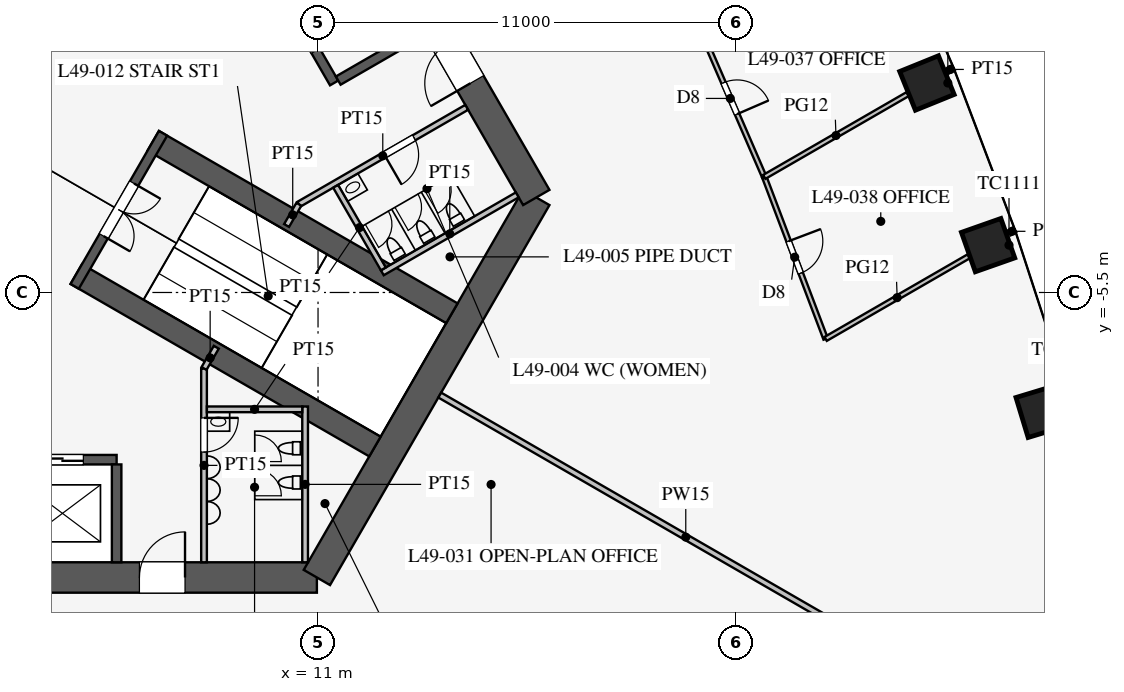
"""IFC4 building model, lengths in metres.
Left out: names, types, materials, properties, quantities, classifications, styles, units other than length and angle.
Written with IfcOpenShell. Run it as: python <this file> out.ifc"""

import sys

from ifc_helpers import new_model, si_unit, direction, frame, frame_2d, origin, origin_2d, place, context, subcontext, project, spatial, rectangle, extrude, element, fill, save


model = new_model("IFC4")
c1 = context("Model", 3, precision=1e-05, world=origin(), true_north=direction((0.0, 1.0)))
c2 = subcontext(c1, "Body", "Model", "MODEL_VIEW")
j1 = project(units=[si_unit("LENGTHUNIT", "METRE"), si_unit("PLANEANGLEUNIT", "RADIAN")], contexts=[c1])
p1 = place(None, origin())
s1 = spatial("IfcSite", under=j1, at=p1, CompositionType="ELEMENT")
p2 = place(p1, origin())
s2 = spatial("IfcBuilding", under=s1, at=p2, CompositionType="ELEMENT")
p3 = place(p2, frame((0.0, 0.0, 214.9)))
s3 = spatial("IfcBuildingStorey", under=s2, at=p3, CompositionType="ELEMENT", Elevation=214.9)
for number, where, z_axis, x_axis in (
    (1, (30.052, -8.63, 0.0), (0.0, 0.0, 1.0), (-0.29, 0.957, 0.0)),
    (2, (28.632, -4.254, 0.0), (0.0, 0.0, 1.0), (-0.332, 0.943, 0.0)),
    (3, (27.022, 0.013, 0.0), (0.0, 0.0, 1.0), (-0.376, 0.927, 0.0)),
):
    element("IfcColumn", number, at=place(p3, frame(where, z_axis=z_axis, x_axis=x_axis)), inside=s3, PredefinedType="COLUMN", context=c2, shape_type="SweptSolid", body=[
        extrude(rectangle(XDim=1.1, YDim=1.1, at=origin_2d()), origin(), (0.0, 0.0, 1.0), 4.2),
    ])
p4 = place(p3, frame((-10.97, -13.0, 0.0), z_axis=(0.0, 0.0, 1.0), x_axis=(1.0, 0.0, 0.0)))
e4 = element("IfcWall", 4, at=p4, inside=s3, PredefinedType="SHEAR", context=c2, shape_type="SweptSolid", body=[
    extrude(rectangle(XDim=21.939, YDim=0.8, at=frame_2d((10.97, 0.0))), origin(), (0.0, 0.0, 1.0), 4.2),
])
p5 = place(p4, frame((17.27, 0.0, 0.0)))
e5 = element("IfcOpeningElement", 5, at=p5, cuts=e4, PredefinedType="OPENING", context=c2, shape_type="SweptSolid", body=[
    extrude(rectangle(XDim=1.2, YDim=2.1, at=frame_2d((0.6, 1.05))), frame((0.0, 0.41, 0.0), z_axis=(0.0, -1.0, 0.0), x_axis=(1.0, 0.0, 0.0)), (0.0, 0.0, 1.0), 0.82),
])
p6 = place(p4, frame((3.47, 0.0, 0.0)))
e6 = element("IfcOpeningElement", 6, at=p6, cuts=e4, PredefinedType="OPENING", context=c2, shape_type="SweptSolid", body=[
    extrude(rectangle(XDim=1.2, YDim=2.1, at=frame_2d((0.6, 1.05))), frame((0.0, 0.41, 0.0), z_axis=(0.0, -1.0, 0.0), x_axis=(1.0, 0.0, 0.0)), (0.0, 0.0, 1.0), 0.82),
])
p7 = place(p3, frame((10.97, -13.0, 0.0), z_axis=(0.0, 0.0, 1.0), x_axis=(0.499995765644, 0.866027848477, 0.0)))
e7 = element("IfcWall", 7, at=p7, inside=s3, PredefinedType="SHEAR", context=c2, shape_type="SweptSolid", body=[
    extrude(rectangle(XDim=11.547, YDim=0.8, at=frame_2d((5.773, 0.0))), origin(), (0.0, 0.0, 1.0), 4.2),
])
p8 = place(p3, frame((16.743, -3.0, 0.0), z_axis=(0.0, 0.0, 1.0), x_axis=(-0.500002442456, 0.866023993627, 0.0)))
e8 = element("IfcWall", 8, at=p8, inside=s3, PredefinedType="SHEAR", context=c2, shape_type="SweptSolid", body=[
    extrude(rectangle(XDim=21.939, YDim=0.8, at=frame_2d((10.97, 0.0))), origin(), (0.0, 0.0, 1.0), 4.2),
])
p9 = place(p8, frame((17.27, 0.0, 0.0)))
e9 = element("IfcOpeningElement", 9, at=p9, cuts=e8, PredefinedType="OPENING", context=c2, shape_type="SweptSolid", body=[
    extrude(rectangle(XDim=1.2, YDim=2.1, at=frame_2d((0.6, 1.05))), frame((0.0, 0.41, 0.0), z_axis=(0.0, -1.0, 0.0), x_axis=(1.0, 0.0, 0.0)), (0.0, 0.0, 1.0), 0.82),
])
p10 = place(p8, frame((3.47, 0.0, 0.0)))
e10 = element("IfcOpeningElement", 10, at=p10, cuts=e8, PredefinedType="OPENING", context=c2, shape_type="SweptSolid", body=[
    extrude(rectangle(XDim=1.2, YDim=2.1, at=frame_2d((0.6, 1.05))), frame((0.0, 0.41, 0.0), z_axis=(0.0, -1.0, 0.0), x_axis=(1.0, 0.0, 0.0)), (0.0, 0.0, 1.0), 0.82),
])
p11 = place(p3, frame((-5.7, -9.9, 0.0), z_axis=(0.0, 0.0, 1.0), x_axis=(1.0, 0.0, 0.0)))
e11 = element("IfcWall", 11, at=p11, inside=s3, PredefinedType="SHEAR", context=c2, shape_type="SweptSolid", body=[
    extrude(rectangle(XDim=11.4, YDim=0.25, at=frame_2d((5.7, 0.0))), origin(), (0.0, 0.0, 1.0), 4.2),
])
p12 = place(p11, frame((0.875, 0.0, 0.0)))
e12 = element("IfcOpeningElement", 12, at=p12, cuts=e11, PredefinedType="OPENING", context=c2, shape_type="SweptSolid", body=[
    extrude(rectangle(XDim=1.1, YDim=2.2, at=frame_2d((0.55, 1.1))), frame((0.0, 0.135, 0.0), z_axis=(0.0, -1.0, 0.0), x_axis=(1.0, 0.0, 0.0)), (0.0, 0.0, 1.0), 0.27),
])
p13 = place(p11, frame((3.725, 0.0, 0.0)))
e13 = element("IfcOpeningElement", 13, at=p13, cuts=e11, PredefinedType="OPENING", context=c2, shape_type="SweptSolid", body=[
    extrude(rectangle(XDim=1.1, YDim=2.2, at=frame_2d((0.55, 1.1))), frame((0.0, 0.135, 0.0), z_axis=(0.0, -1.0, 0.0), x_axis=(1.0, 0.0, 0.0)), (0.0, 0.0, 1.0), 0.27),
])
p14 = place(p11, frame((6.575, 0.0, 0.0)))
e14 = element("IfcOpeningElement", 14, at=p14, cuts=e11, PredefinedType="OPENING", context=c2, shape_type="SweptSolid", body=[
    extrude(rectangle(XDim=1.1, YDim=2.2, at=frame_2d((0.55, 1.1))), frame((0.0, 0.135, 0.0), z_axis=(0.0, -1.0, 0.0), x_axis=(1.0, 0.0, 0.0)), (0.0, 0.0, 1.0), 0.27),
])
p15 = place(p11, frame((9.425, 0.0, 0.0)))
e15 = element("IfcOpeningElement", 15, at=p15, cuts=e11, PredefinedType="OPENING", context=c2, shape_type="SweptSolid", body=[
    extrude(rectangle(XDim=1.1, YDim=2.2, at=frame_2d((0.55, 1.1))), frame((0.0, 0.135, 0.0), z_axis=(0.0, -1.0, 0.0), x_axis=(1.0, 0.0, 0.0)), (0.0, 0.0, 1.0), 0.27),
])
p16 = place(p3, frame((5.7, -10.025, 0.0), z_axis=(0.0, 0.0, 1.0), x_axis=(0.0, -1.0, 0.0)))
e16 = element("IfcWall", 16, at=p16, inside=s3, PredefinedType="SHEAR", context=c2, shape_type="SweptSolid", body=[
    extrude(rectangle(XDim=2.575, YDim=0.25, at=frame_2d((1.288, 0.0))), origin(), (0.0, 0.0, 1.0), 4.2),
])
p17 = place(p3, frame((11.424, 0.014, 0.0), z_axis=(0.0, 0.0, 1.0), x_axis=(-0.500001763848, 0.866024385424, 0.0)))
e17 = element("IfcWall", 17, at=p17, inside=s3, PredefinedType="SHEAR", context=c2, shape_type="SweptSolid", body=[
    extrude(rectangle(XDim=11.4, YDim=0.25, at=frame_2d((5.7, 0.0))), origin(), (0.0, 0.0, 1.0), 4.2),
])
p18 = place(p17, frame((0.975, 0.0, 0.0)))
e18 = element("IfcOpeningElement", 18, at=p18, cuts=e17, PredefinedType="OPENING", context=c2, shape_type="SweptSolid", body=[
    extrude(rectangle(XDim=0.9, YDim=2.1, at=frame_2d((0.45, 1.05))), frame((0.0, 0.135, 0.0), z_axis=(0.0, -1.0, 0.0), x_axis=(1.0, 0.0, 0.0)), (0.0, 0.0, 1.0), 0.27),
])
p19 = place(p17, frame((3.825, 0.0, 0.0)))
e19 = element("IfcOpeningElement", 19, at=p19, cuts=e17, PredefinedType="OPENING", context=c2, shape_type="SweptSolid", body=[
    extrude(rectangle(XDim=0.9, YDim=2.1, at=frame_2d((0.45, 1.05))), frame((0.0, 0.135, 0.0), z_axis=(0.0, -1.0, 0.0), x_axis=(1.0, 0.0, 0.0)), (0.0, 0.0, 1.0), 0.27),
])
p20 = place(p17, frame((6.675, 0.0, 0.0)))
e20 = element("IfcOpeningElement", 20, at=p20, cuts=e17, PredefinedType="OPENING", context=c2, shape_type="SweptSolid", body=[
    extrude(rectangle(XDim=0.9, YDim=2.1, at=frame_2d((0.45, 1.05))), frame((0.0, 0.135, 0.0), z_axis=(0.0, -1.0, 0.0), x_axis=(1.0, 0.0, 0.0)), (0.0, 0.0, 1.0), 0.27),
])
p21 = place(p17, frame((9.525, 0.0, 0.0)))
e21 = element("IfcOpeningElement", 21, at=p21, cuts=e17, PredefinedType="OPENING", context=c2, shape_type="SweptSolid", body=[
    extrude(rectangle(XDim=0.9, YDim=2.1, at=frame_2d((0.45, 1.05))), frame((0.0, 0.135, 0.0), z_axis=(0.0, -1.0, 0.0), x_axis=(1.0, 0.0, 0.0)), (0.0, 0.0, 1.0), 0.27),
])
p22 = place(p3, frame((11.532, 0.076, 0.0), z_axis=(0.0, 0.0, 1.0), x_axis=(0.866005588531, 0.500034319456, 0.0)))
e22 = element("IfcWall", 22, at=p22, inside=s3, PredefinedType="SHEAR", context=c2, shape_type="SweptSolid", body=[
    extrude(rectangle(XDim=2.575, YDim=0.25, at=frame_2d((1.288, 0.0))), origin(), (0.0, 0.0, 1.0), 4.2),
])
for number, where, z_axis, x_axis in (
    (23, (4.638, -5.016, 0.0), (0.0, 0.0, 1.0), (0.866, -0.5, 0.0)),
    (24, (6.663, -1.509, 0.0), (0.0, 0.0, 1.0), (0.866, -0.5, 0.0)),
):
    element("IfcWall", number, at=place(p3, frame(where, z_axis=z_axis, x_axis=x_axis)), inside=s3, PredefinedType="SHEAR", context=c2, shape_type="SweptSolid", body=[
        extrude(rectangle(XDim=9.075, YDim=0.6, at=frame_2d((4.538, 0.0))), origin(), (0.0, 0.0, 1.0), 4.2),
    ])
p23 = place(p3, frame((4.597, -5.339, 0.0), z_axis=(0.0, 0.0, 1.0), x_axis=(0.499984536904, 0.866034331223, 0.0)))
e25 = element("IfcWall", 25, at=p23, inside=s3, PredefinedType="SHEAR", context=c2, shape_type="SweptSolid", body=[
    extrude(rectangle(XDim=4.65, YDim=0.25, at=frame_2d((2.325, 0.0))), origin(), (0.0, 0.0, 1.0), 4.2),
])
p24 = place(p23, frame((1.525, 0.0, 0.0)))
e26 = element("IfcOpeningElement", 26, at=p24, cuts=e25, PredefinedType="OPENING", context=c2, shape_type="SweptSolid", body=[
    extrude(rectangle(XDim=1.6, YDim=2.1, at=frame_2d((0.8, 1.05))), frame((0.0, 0.135, 0.0), z_axis=(0.0, -1.0, 0.0), x_axis=(1.0, 0.0, 0.0)), (0.0, 0.0, 1.0), 0.27),
])
p25 = place(p3, frame((8.0, -7.5, 0.0), z_axis=(0.0, 0.0, 1.0), x_axis=(0.0, -1.0, 0.0)))
e27 = element("IfcWall", 27, at=p25, inside=s3, PredefinedType="PARTITIONING", context=c2, shape_type="SweptSolid", body=[
    extrude(rectangle(XDim=5.1, YDim=0.15, at=frame_2d((2.55, 0.0))), origin(), (0.0, 0.0, 1.0), 4.0),
])
p26 = place(p25, frame((1.3, 0.0, 0.0)))
e28 = element("IfcOpeningElement", 28, at=p26, cuts=e27, PredefinedType="OPENING", context=c2, shape_type="SweptSolid", body=[
    extrude(rectangle(XDim=0.9, YDim=2.1, at=frame_2d((0.45, 1.05))), frame((0.0, 0.085, 0.0), z_axis=(0.0, -1.0, 0.0), x_axis=(1.0, 0.0, 0.0)), (0.0, 0.0, 1.0), 0.17),
])
p27 = place(p3, frame((10.495, -3.178, 0.0), z_axis=(0.0, 0.0, 1.0), x_axis=(0.86602216432, 0.500005610874, 0.0)))
e29 = element("IfcWall", 29, at=p27, inside=s3, PredefinedType="PARTITIONING", context=c2, shape_type="SweptSolid", body=[
    extrude(rectangle(XDim=5.1, YDim=0.15, at=frame_2d((2.55, 0.0))), origin(), (0.0, 0.0, 1.0), 4.0),
])
p28 = place(p27, frame((2.6, 0.0, 0.0)))
e30 = element("IfcOpeningElement", 30, at=p28, cuts=e29, PredefinedType="OPENING", context=c2, shape_type="SweptSolid", body=[
    extrude(rectangle(XDim=0.9, YDim=2.1, at=frame_2d((0.45, 1.05))), frame((0.0, 0.085, 0.0), z_axis=(0.0, -1.0, 0.0), x_axis=(1.0, 0.0, 0.0)), (0.0, 0.0, 1.0), 0.17),
])
for number, where, z_axis, x_axis in (
    (31, (8.0, -7.5, 0.0), (0.0, 0.0, 1.0), (0.5, 0.866, 0.0)),
    (32, (10.495, -3.178, 0.0), (0.0, 0.0, 1.0), (-0.5, -0.866, 0.0)),
):
    element("IfcWall", number, at=place(p3, frame(where, z_axis=z_axis, x_axis=x_axis)), inside=s3, PredefinedType="PARTITIONING", context=c2, shape_type="SweptSolid", body=[
        extrude(rectangle(XDim=0.645, YDim=0.15, at=frame_2d((0.323, 0.0))), origin(), (0.0, 0.0, 1.0), 4.0),
    ])
p29 = place(p3, frame((10.66, -8.5, 0.0), z_axis=(0.0, 0.0, 1.0), x_axis=(0.0, -1.0, 0.0)))
e33 = element("IfcWall", 33, at=p29, inside=s3, PredefinedType="PARTITIONING", context=c2, shape_type="SweptSolid", body=[
    extrude(rectangle(XDim=4.1, YDim=0.15, at=frame_2d((2.05, 0.0))), origin(), (0.0, 0.0, 1.0), 4.0),
])
p30 = place(p3, frame((8.075, -8.575, 0.0), z_axis=(0.0, 0.0, 1.0), x_axis=(1.0, 0.0, 0.0)))
e34 = element("IfcWall", 34, at=p30, inside=s3, PredefinedType="PARTITIONING", context=c2, shape_type="SweptSolid", body=[
    extrude(rectangle(XDim=2.51, YDim=0.15, at=frame_2d((1.255, 0.0))), origin(), (0.0, 0.0, 1.0), 4.0),
])
p31 = place(p3, frame((12.691, -4.982, 0.0), z_axis=(0.0, 0.0, 1.0), x_axis=(0.8660249478, 0.500000789788, 0.0)))
e35 = element("IfcWall", 35, at=p31, inside=s3, PredefinedType="PARTITIONING", context=c2, shape_type="SweptSolid", body=[
    extrude(rectangle(XDim=4.1, YDim=0.15, at=frame_2d((2.05, 0.0))), origin(), (0.0, 0.0, 1.0), 4.0),
])
p32 = place(p3, frame((11.464, -2.706, 0.0), z_axis=(0.0, 0.0, 1.0), x_axis=(0.50001992892, -0.866013897511, 0.0)))
e36 = element("IfcWall", 36, at=p32, inside=s3, PredefinedType="PARTITIONING", context=c2, shape_type="SweptSolid", body=[
    extrude(rectangle(XDim=2.51, YDim=0.15, at=frame_2d((1.255, 0.0))), origin(), (0.0, 0.0, 1.0), 4.0),
])
p33 = place(p3, frame((14.203, -8.2, 0.0), z_axis=(0.0, 0.0, 1.0), x_axis=(0.866021600284, -0.500006587798, 0.0)))
e37 = element("IfcWall", 37, at=p33, inside=s3, PredefinedType="PARTITIONING", context=c2, shape_type="SweptSolid", body=[
    extrude(rectangle(XDim=14.95, YDim=0.15, at=frame_2d((7.475, 0.0))), origin(), (0.0, 0.0, 1.0), 2.4),
])
p34 = place(p3, frame((27.563, 0.325, 0.0), z_axis=(0.0, 0.0, 1.0), x_axis=(0.865614066289, 0.500711781609, 0.0)))
e38 = element("IfcWall", 38, at=p34, inside=s3, PredefinedType="PARTITIONING", context=c2, shape_type="SweptSolid", body=[
    extrude(rectangle(XDim=0.178, YDim=0.15, at=frame_2d((0.089, 0.0))), origin(), (0.0, 0.0, 1.0), 2.9),
])
p35 = place(p3, frame((29.191, -3.931, 0.0), z_axis=(0.0, 0.0, 1.0), x_axis=(0.866484919499, 0.499203249469, 0.0)))
e39 = element("IfcWall", 39, at=p35, inside=s3, PredefinedType="PARTITIONING", context=c2, shape_type="SweptSolid", body=[
    extrude(rectangle(XDim=0.163, YDim=0.15, at=frame_2d((0.082, 0.0))), origin(), (0.0, 0.0, 1.0), 2.9),
])
p36 = place(p3, frame((22.742, -2.458, 0.0), z_axis=(0.0, 0.0, 1.0), x_axis=(-0.397253491631, 0.917708920839, 0.0)))
e40 = element("IfcWall", 40, at=p36, inside=s3, PredefinedType="PARTITIONING", context=c2, shape_type="SweptSolid", body=[
    extrude(rectangle(XDim=4.53, YDim=0.12, at=frame_2d((2.265, 0.0))), origin(), (0.0, 0.0, 1.0), 2.9),
])
p37 = place(p36, frame((1.8, 0.0, 0.15)))
e41 = element("IfcOpeningElement", 41, at=p37, cuts=e40, PredefinedType="OPENING", context=c2, shape_type="SweptSolid", body=[
    extrude(rectangle(XDim=0.9, YDim=2.1, at=frame_2d((0.45, 1.05))), frame((0.0, 0.07, 0.0), z_axis=(0.0, -1.0, 0.0), x_axis=(1.0, 0.0, 0.0)), (0.0, 0.0, 1.0), 0.14),
])
p38 = place(p3, frame((24.357, -6.722, 0.0), z_axis=(0.0, 0.0, 1.0), x_axis=(-0.354219967303, 0.935162132875, 0.0)))
e42 = element("IfcWall", 42, at=p38, inside=s3, PredefinedType="PARTITIONING", context=c2, shape_type="SweptSolid", body=[
    extrude(rectangle(XDim=4.559, YDim=0.12, at=frame_2d((2.28, 0.0))), origin(), (0.0, 0.0, 1.0), 2.9),
])
p39 = place(p38, frame((1.85, 0.0, 0.15)))
e43 = element("IfcOpeningElement", 43, at=p39, cuts=e42, PredefinedType="OPENING", context=c2, shape_type="SweptSolid", body=[
    extrude(rectangle(XDim=0.9, YDim=2.1, at=frame_2d((0.45, 1.05))), frame((0.0, 0.07, 0.0), z_axis=(0.0, -1.0, 0.0), x_axis=(1.0, 0.0, 0.0)), (0.0, 0.0, 1.0), 0.14),
])
p40 = place(p3, frame((22.742, -2.458, 0.0), z_axis=(0.0, 0.0, 1.0), x_axis=(0.866034407719, 0.499984404404, 0.0)))
e44 = element("IfcWall", 44, at=p40, inside=s3, PredefinedType="PARTITIONING", context=c2, shape_type="SweptSolid", body=[
    extrude(rectangle(XDim=4.357, YDim=0.12, at=frame_2d((2.178, 0.0))), origin(), (0.0, 0.0, 1.0), 2.9),
])
p41 = place(p3, frame((24.357, -6.722, 0.0), z_axis=(0.0, 0.0, 1.0), x_axis=(0.866025625133, 0.499999616612, 0.0)))
e45 = element("IfcWall", 45, at=p41, inside=s3, PredefinedType="PARTITIONING", context=c2, shape_type="SweptSolid", body=[
    extrude(rectangle(XDim=4.346, YDim=0.12, at=frame_2d((2.173, 0.0))), origin(), (0.0, 0.0, 1.0), 2.9),
])
p42 = place(p26, origin())
e46 = element("IfcDoor", 46, at=p42, inside=s3, OperationType="SINGLE_SWING_LEFT", PredefinedType="DOOR", context=c2, shape_type="SweptSolid", body=[
    extrude(rectangle(XDim=0.9, YDim=2.1, at=frame_2d((0.45, 1.05))), frame((0.0, 0.025, 0.0), z_axis=(0.0, -1.0, 0.0), x_axis=(1.0, 0.0, 0.0)), (0.0, 0.0, 1.0), 0.05),
])
fill(e28, e46)
p43 = place(p28, frame((0.9, 0.0, 0.0), z_axis=(0.0, 0.0, 1.0), x_axis=(-1.0, 0.0, 0.0)))
e47 = element("IfcDoor", 47, at=p43, inside=s3, OperationType="SINGLE_SWING_RIGHT", PredefinedType="DOOR", context=c2, shape_type="SweptSolid", body=[
    extrude(rectangle(XDim=0.9, YDim=2.1, at=frame_2d((0.45, 1.05))), frame((0.0, 0.025, 0.0), z_axis=(0.0, -1.0, 0.0), x_axis=(1.0, 0.0, 0.0)), (0.0, 0.0, 1.0), 0.05),
])
fill(e30, e47)
p44 = place(p24, frame((1.6, 0.0, 0.0), z_axis=(0.0, 0.0, 1.0), x_axis=(-1.0, 0.0, 0.0)))
e48 = element("IfcDoor", 48, at=p44, inside=s3, OperationType="DOUBLE_DOOR_SINGLE_SWING", PredefinedType="DOOR", context=c2, shape_type="SweptSolid", body=[
    extrude(rectangle(XDim=1.6, YDim=2.1, at=frame_2d((0.8, 1.05))), frame((0.0, 0.025, 0.0), z_axis=(0.0, -1.0, 0.0), x_axis=(1.0, 0.0, 0.0)), (0.0, 0.0, 1.0), 0.05),
])
fill(e26, e48)
p45 = place(p5, origin())
e49 = element("IfcDoor", 49, at=p45, inside=s3, OperationType="SINGLE_SWING_RIGHT", PredefinedType="DOOR", context=c2, shape_type="SweptSolid", body=[
    extrude(rectangle(XDim=1.2, YDim=2.1, at=frame_2d((0.6, 1.05))), frame((0.0, 0.025, 0.0), z_axis=(0.0, -1.0, 0.0), x_axis=(1.0, 0.0, 0.0)), (0.0, 0.0, 1.0), 0.05),
])
fill(e5, e49)
p46 = place(p10, origin())
e50 = element("IfcDoor", 50, at=p46, inside=s3, OperationType="SINGLE_SWING_LEFT", PredefinedType="DOOR", context=c2, shape_type="SweptSolid", body=[
    extrude(rectangle(XDim=1.2, YDim=2.1, at=frame_2d((0.6, 1.05))), frame((0.0, 0.025, 0.0), z_axis=(0.0, -1.0, 0.0), x_axis=(1.0, 0.0, 0.0)), (0.0, 0.0, 1.0), 0.05),
])
fill(e10, e50)
p47 = place(p37, frame((0.9, 0.0, 0.0), z_axis=(0.0, 0.0, 1.0), x_axis=(-1.0, 0.0, 0.0)))
e51 = element("IfcDoor", 51, at=p47, inside=s3, OperationType="SINGLE_SWING_RIGHT", PredefinedType="DOOR", context=c2, shape_type="SweptSolid", body=[
    extrude(rectangle(XDim=0.9, YDim=2.1, at=frame_2d((0.45, 1.05))), frame((0.0, 0.025, 0.0), z_axis=(0.0, -1.0, 0.0), x_axis=(1.0, 0.0, 0.0)), (0.0, 0.0, 1.0), 0.05),
])
fill(e41, e51)
p48 = place(p39, frame((0.9, 0.0, 0.0), z_axis=(0.0, 0.0, 1.0), x_axis=(-1.0, 0.0, 0.0)))
e52 = element("IfcDoor", 52, at=p48, inside=s3, OperationType="SINGLE_SWING_LEFT", PredefinedType="DOOR", context=c2, shape_type="SweptSolid", body=[
    extrude(rectangle(XDim=0.9, YDim=2.1, at=frame_2d((0.45, 1.05))), frame((0.0, 0.025, 0.0), z_axis=(0.0, -1.0, 0.0), x_axis=(1.0, 0.0, 0.0)), (0.0, 0.0, 1.0), 0.05),
])
fill(e43, e52)
p49 = place(p15, origin())
e53 = element("IfcDoor", 53, at=p49, inside=s3, OperationType="DOUBLE_DOOR_SLIDING", PredefinedType="DOOR", context=c2, shape_type="SweptSolid", body=[
    extrude(rectangle(XDim=1.1, YDim=2.2, at=frame_2d((0.55, 1.1))), frame((0.0, 0.025, 0.0), z_axis=(0.0, -1.0, 0.0), x_axis=(1.0, 0.0, 0.0)), (0.0, 0.0, 1.0), 0.05),
])
fill(e15, e53)
save(model, sys.argv[1])
